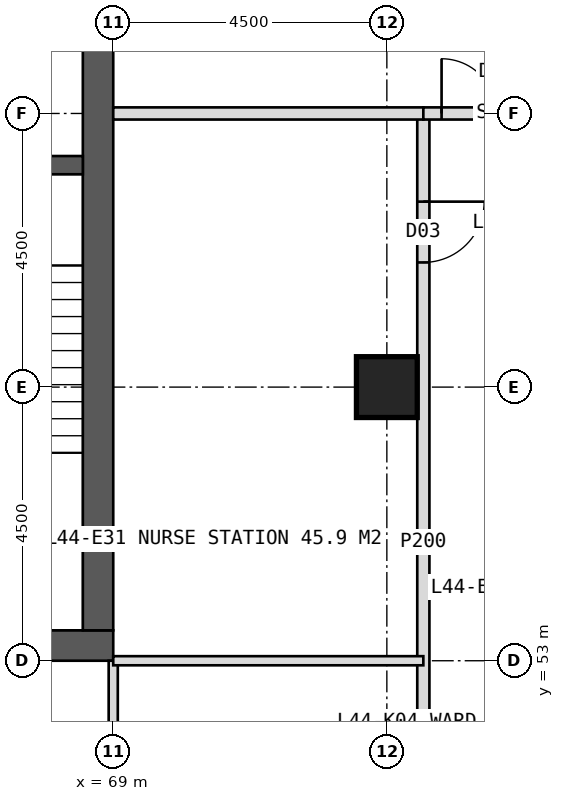
"""IFC4 building model, lengths in metres.
Left out: names, types, materials, properties, quantities, classifications, styles, units other than length and angle.
Written with IfcOpenShell. Run it as: python <this file> out.ifc"""

import sys

from ifc_helpers import new_model, si_unit, direction, frame, frame_2d, origin, origin_2d, place, context, subcontext, project, spatial, rectangle, hollow_rectangle, extrude, element, fill, save


model = new_model("IFC4")
c1 = context("Model", 3, precision=1e-05, world=origin(), true_north=direction((0.0, 1.0)))
c2 = subcontext(c1, "Body", "Model", "MODEL_VIEW")
j1 = project(units=[si_unit("LENGTHUNIT", "METRE"), si_unit("PLANEANGLEUNIT", "RADIAN")], contexts=[c1])
p1 = place(None, origin())
s1 = spatial("IfcSite", under=j1, at=p1, CompositionType="ELEMENT")
p2 = place(p1, origin())
s2 = spatial("IfcBuilding", under=s1, at=p2, CompositionType="ELEMENT")
p3 = place(p2, frame((0.0, 0.0, 185.0)))
s3 = spatial("IfcBuildingStorey", under=s2, at=p3, CompositionType="ELEMENT", Elevation=185.0)
p4 = place(p3, frame((51.0, 53.25, 0.0), z_axis=(0.0, 0.0, 1.0), x_axis=(1.0, 0.0, 0.0)))
e1 = element("IfcWall", 1, at=p4, inside=s3, PredefinedType="SHEAR", context=c2, shape_type="SweptSolid", body=[
    extrude(rectangle(XDim=18.0, YDim=0.5, at=frame_2d((9.0, 0.0))), origin(), (0.0, 0.0, 1.0), 4.0),
])
p5 = place(p4, frame((8.1, 0.0, 0.0)))
e2 = element("IfcOpeningElement", 2, at=p5, cuts=e1, PredefinedType="OPENING", context=c2, shape_type="SweptSolid", body=[
    extrude(rectangle(XDim=1.8, YDim=2.2, at=frame_2d((0.9, 1.1))), frame((0.0, 0.26, 0.0), z_axis=(0.0, -1.0, 0.0), x_axis=(1.0, 0.0, 0.0)), (0.0, 0.0, 1.0), 0.52),
])
p6 = place(p3, frame((68.75, 53.5, 0.0), z_axis=(0.0, 0.0, 1.0), x_axis=(0.0, 1.0, 0.0)))
e3 = element("IfcWall", 3, at=p6, inside=s3, PredefinedType="SHEAR", context=c2, shape_type="SweptSolid", body=[
    extrude(rectangle(XDim=17.0, YDim=0.5, at=frame_2d((8.5, 0.0))), origin(), (0.0, 0.0, 1.0), 4.0),
])
p7 = place(p6, frame((9.6, 0.0, 0.0)))
e4 = element("IfcOpeningElement", 4, at=p7, cuts=e3, PredefinedType="OPENING", context=c2, shape_type="SweptSolid", body=[
    extrude(rectangle(XDim=1.5, YDim=2.2, at=frame_2d((0.75, 1.1))), frame((0.0, 0.26, 0.0), z_axis=(0.0, -1.0, 0.0), x_axis=(1.0, 0.0, 0.0)), (0.0, 0.0, 1.0), 0.52),
])
p8 = place(p3, frame((65.2, 61.15, 0.0), z_axis=(0.0, 0.0, 1.0), x_axis=(1.0, 0.0, 0.0)))
e5 = element("IfcWall", 5, at=p8, inside=s3, PredefinedType="SHEAR", context=c2, shape_type="SweptSolid", body=[
    extrude(rectangle(XDim=3.3, YDim=0.3, at=frame_2d((1.65, 0.0))), origin(), (0.0, 0.0, 1.0), 4.0),
])
p9 = place(p8, frame((1.05, 0.0, 0.0)))
e6 = element("IfcOpeningElement", 6, at=p9, cuts=e5, PredefinedType="OPENING", context=c2, shape_type="SweptSolid", body=[
    extrude(rectangle(XDim=1.2, YDim=2.1, at=frame_2d((0.6, 1.05))), frame((0.0, 0.16, 0.0), z_axis=(0.0, -1.0, 0.0), x_axis=(1.0, 0.0, 0.0)), (0.0, 0.0, 1.0), 0.32),
])
p10 = place(p3, frame((73.5, 57.5, 0.0), z_axis=(0.0, 0.0, 1.0), x_axis=(1.0, 0.0, 0.0)))
e7 = element("IfcColumn", 7, at=p10, inside=s3, PredefinedType="COLUMN", context=c2, shape_type="SweptSolid", body=[
    extrude(hollow_rectangle(XDim=1.0, YDim=1.0, WallThickness=0.1, at=origin_2d()), origin(), (0.0, 0.0, 1.0), 4.0),
])
p11 = place(p3, frame((69.0, 53.0, 0.0), z_axis=(0.0, 0.0, 1.0), x_axis=(0.0, -1.0, 0.0)))
e8 = element("IfcWall", 8, at=p11, inside=s3, PredefinedType="PARTITIONING", context=c2, shape_type="SweptSolid", body=[
    extrude(rectangle(XDim=5.1, YDim=0.15, at=frame_2d((2.55, 0.0))), origin(), (0.0, 0.0, 1.0), 3.75),
])
p12 = place(p3, frame((74.1, 62.0, 0.0), z_axis=(0.0, 0.0, 1.0), x_axis=(0.0, -1.0, 0.0)))
e9 = element("IfcWall", 9, at=p12, inside=s3, PredefinedType="PARTITIONING", context=c2, shape_type="SweptSolid", body=[
    extrude(rectangle(XDim=14.1, YDim=0.2, at=frame_2d((7.05, 0.0))), origin(), (0.0, 0.0, 1.0), 3.75),
])
p13 = place(p12, frame((1.45, 0.0, 0.0)))
e10 = element("IfcOpeningElement", 10, at=p13, cuts=e9, PredefinedType="OPENING", context=c2, shape_type="SweptSolid", body=[
    extrude(rectangle(XDim=1.0, YDim=2.1, at=frame_2d((0.5, 1.05))), frame((0.0, 0.11, 0.0), z_axis=(0.0, -1.0, 0.0), x_axis=(1.0, 0.0, 0.0)), (0.0, 0.0, 1.0), 0.22),
])
p14 = place(p12, frame((11.05, 0.0, 0.0)))
e11 = element("IfcOpeningElement", 11, at=p14, cuts=e9, PredefinedType="OPENING", context=c2, shape_type="SweptSolid", body=[
    extrude(rectangle(XDim=1.0, YDim=2.1, at=frame_2d((0.5, 1.05))), frame((0.0, 0.11, 0.0), z_axis=(0.0, -1.0, 0.0), x_axis=(1.0, 0.0, 0.0)), (0.0, 0.0, 1.0), 0.22),
])
p15 = place(p3, frame((69.0, 62.0, 0.0), z_axis=(0.0, 0.0, 1.0), x_axis=(1.0, 0.0, 0.0)))
e12 = element("IfcWall", 12, at=p15, inside=s3, PredefinedType="SOLIDWALL", context=c2, shape_type="SweptSolid", body=[
    extrude(rectangle(XDim=5.1, YDim=0.2, at=frame_2d((2.55, 0.0))), origin(), (0.0, 0.0, 1.0), 2.95),
])
p16 = place(p3, frame((69.0, 53.0, 0.0), z_axis=(0.0, 0.0, 1.0), x_axis=(1.0, 0.0, 0.0)))
e13 = element("IfcWall", 13, at=p16, inside=s3, PredefinedType="PARTITIONING", context=c2, shape_type="SweptSolid", body=[
    extrude(rectangle(XDim=5.1, YDim=0.15, at=frame_2d((2.55, 0.0))), origin(), (0.0, 0.0, 1.0), 3.75),
])
p17 = place(p3, frame((74.1, 62.0, 0.0), z_axis=(0.0, 0.0, 1.0), x_axis=(1.0, 0.0, 0.0)))
e14 = element("IfcWall", 14, at=p17, inside=s3, PredefinedType="SOLIDWALL", context=c2, shape_type="SweptSolid", body=[
    extrude(rectangle(XDim=2.7, YDim=0.2, at=frame_2d((1.35, 0.0))), origin(), (0.0, 0.0, 1.0), 2.95),
])
p18 = place(p17, frame((0.3, 0.0, 0.0)))
e15 = element("IfcOpeningElement", 15, at=p18, cuts=e14, PredefinedType="OPENING", context=c2, shape_type="SweptSolid", body=[
    extrude(rectangle(XDim=1.8, YDim=2.2, at=frame_2d((0.9, 1.1))), frame((0.0, 0.11, 0.0), z_axis=(0.0, -1.0, 0.0), x_axis=(1.0, 0.0, 0.0)), (0.0, 0.0, 1.0), 0.22),
])
p19 = place(p13, origin())
e16 = element("IfcDoor", 16, at=p19, inside=s3, OperationType="SINGLE_SWING_LEFT", PredefinedType="DOOR", context=c2, shape_type="SweptSolid", body=[
    extrude(rectangle(XDim=1.0, YDim=2.1, at=frame_2d((0.5, 1.05))), frame((0.0, 0.025, 0.0), z_axis=(0.0, -1.0, 0.0), x_axis=(1.0, 0.0, 0.0)), (0.0, 0.0, 1.0), 0.05),
])
fill(e10, e16)
p20 = place(p18, origin())
e17 = element("IfcDoor", 17, at=p20, inside=s3, OperationType="DOUBLE_DOOR_DOUBLE_SWING", PredefinedType="DOOR", context=c2, shape_type="SweptSolid", body=[
    extrude(rectangle(XDim=1.8, YDim=2.2, at=frame_2d((0.9, 1.1))), frame((0.0, 0.025, 0.0), z_axis=(0.0, -1.0, 0.0), x_axis=(1.0, 0.0, 0.0)), (0.0, 0.0, 1.0), 0.05),
])
fill(e15, e17)
save(model, sys.argv[1])
